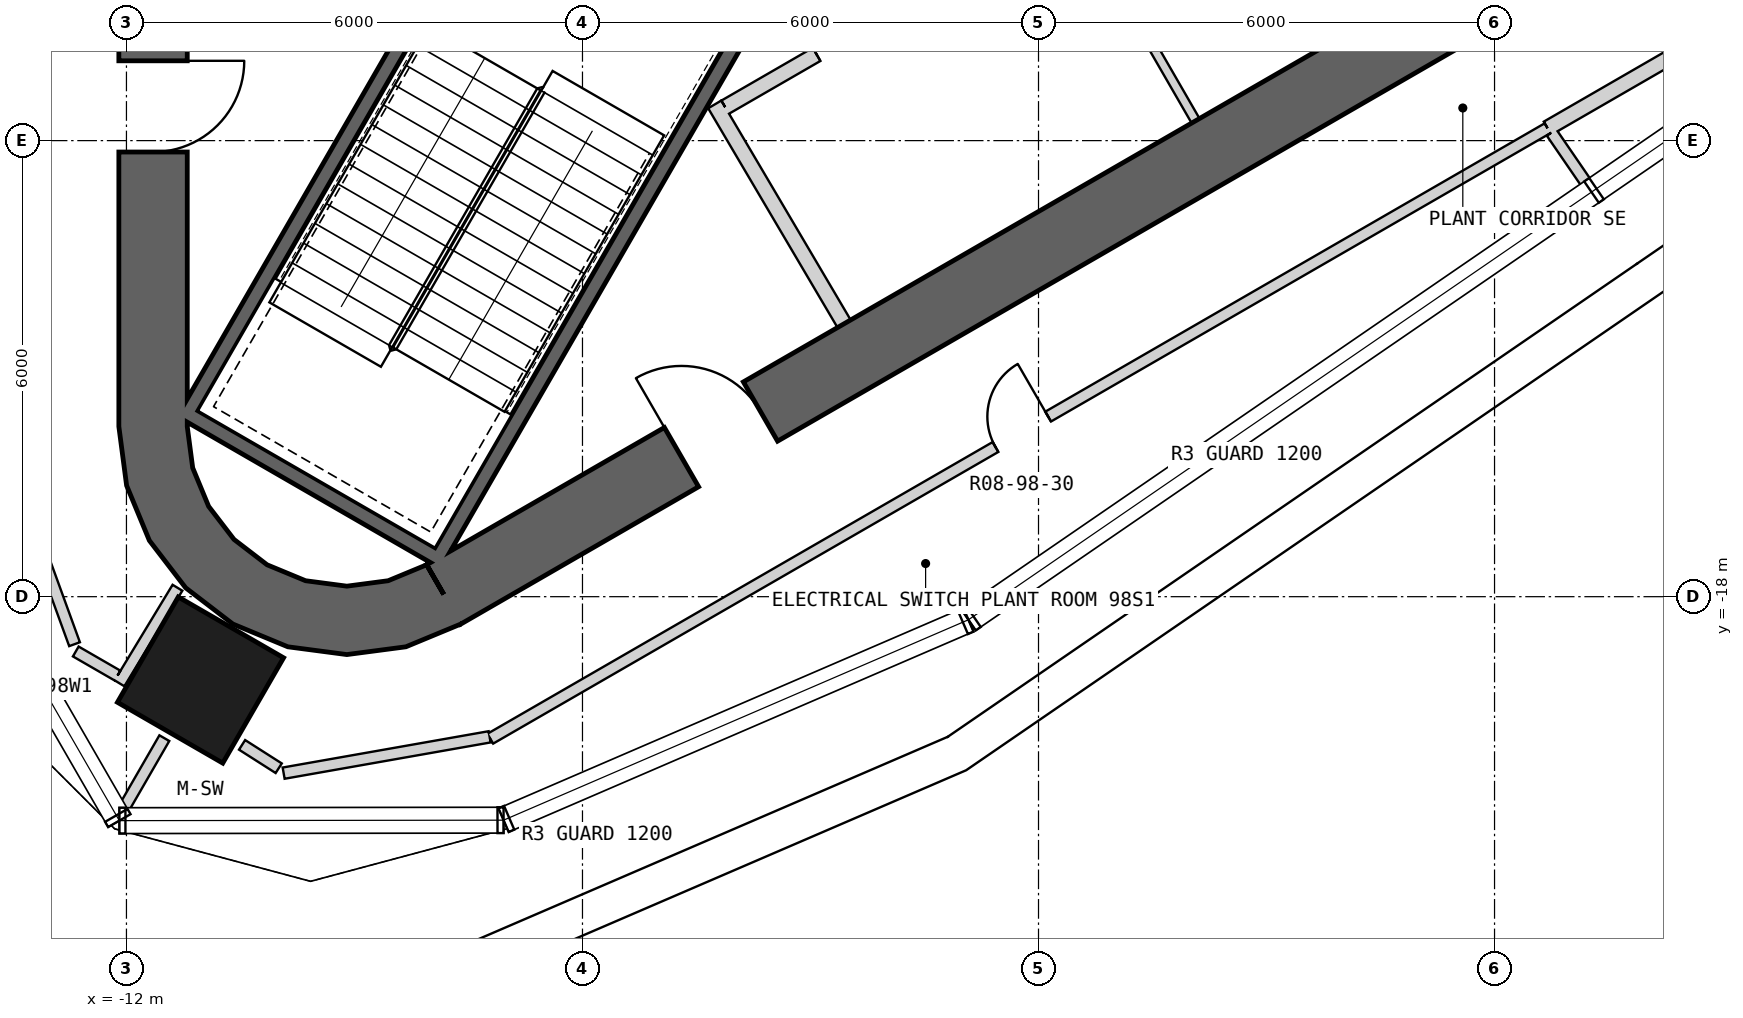
"""IFC4 building model, lengths in metres.
Left out: names, types, materials, properties, quantities, classifications, styles, units other than length and angle.
Written with IfcOpenShell. Run it as: python <this file> out.ifc"""

import sys

from ifc_helpers import new_model, si_unit, direction, frame, frame_2d, origin, origin_2d, place, context, subcontext, project, spatial, polyline, rectangle, outline, extrude, element, fill, save


model = new_model("IFC4")
c1 = context("Model", 3, precision=1e-05, world=origin(), true_north=direction((0.0, 1.0)))
c2 = subcontext(c1, "Body", "Model", "MODEL_VIEW")
j1 = project(units=[si_unit("LENGTHUNIT", "METRE"), si_unit("PLANEANGLEUNIT", "RADIAN")], contexts=[c1])
p1 = place(None, origin())
s1 = spatial("IfcSite", under=j1, at=p1, CompositionType="ELEMENT")
p2 = place(p1, origin())
s2 = spatial("IfcBuilding", under=s1, at=p2, CompositionType="ELEMENT")
p3 = place(p2, frame((0.0, 0.0, 435.3)))
s3 = spatial("IfcBuildingStorey", under=s2, at=p3, CompositionType="ELEMENT", Elevation=435.3)
p4 = place(p3, frame((-11.025, -19.097, 0.0), z_axis=(0.0, 0.0, 1.0), x_axis=(-0.5, -0.866025403784, 0.0)))
e1 = element("IfcColumn", 1, at=p4, inside=s3, PredefinedType="COLUMN", context=c2, shape_type="SweptSolid", body=[
    extrude(rectangle(XDim=1.6, YDim=1.6, at=origin_2d()), origin(), (0.0, 0.0, 1.0), 5.0),
])
p5 = place(p3, frame((-11.65, 15.762, 0.0), z_axis=(0.0, 0.0, 1.0), x_axis=(0.0, -1.0, 0.0)))
e2 = element("IfcWall", 2, at=p5, inside=s3, PredefinedType="SHEAR", context=c2, shape_type="SweptSolid", body=[
    extrude(rectangle(XDim=31.523, YDim=0.9, at=frame_2d((15.762, 0.0))), origin(), (0.0, 0.0, 1.0), 5.0),
])
p6 = place(p5, frame((3.612, 0.0, 0.0)))
e3 = element("IfcOpeningElement", 3, at=p6, cuts=e2, PredefinedType="OPENING", context=c2, shape_type="SweptSolid", body=[
    extrude(rectangle(XDim=1.2, YDim=2.4, at=frame_2d((0.6, 1.2))), frame((0.0, 0.46, 0.0), z_axis=(0.0, -1.0, 0.0), x_axis=(1.0, 0.0, 0.0)), (0.0, 0.0, 1.0), 0.92),
])
p7 = place(p5, frame((26.712, 0.0, 0.0)))
e4 = element("IfcOpeningElement", 4, at=p7, cuts=e2, PredefinedType="OPENING", context=c2, shape_type="SweptSolid", body=[
    extrude(rectangle(XDim=1.2, YDim=2.4, at=frame_2d((0.6, 1.2))), frame((0.0, 0.46, 0.0), z_axis=(0.0, -1.0, 0.0), x_axis=(1.0, 0.0, 0.0)), (0.0, 0.0, 1.0), 0.92),
])
p8 = place(p3, frame((-7.825, -17.97, 0.0), z_axis=(0.0, 0.0, 1.0), x_axis=(0.866028369851, 0.499994862586, 0.0)))
e5 = element("IfcWall", 5, at=p8, inside=s3, PredefinedType="SHEAR", context=c2, shape_type="SweptSolid", body=[
    extrude(rectangle(XDim=31.523, YDim=0.9, at=frame_2d((15.762, 0.0))), origin(), (0.0, 0.0, 1.0), 5.0),
])
p9 = place(p8, frame((17.862, 0.0, 0.0)))
e6 = element("IfcOpeningElement", 6, at=p9, cuts=e5, PredefinedType="OPENING", context=c2, shape_type="SweptSolid", body=[
    extrude(rectangle(XDim=1.2, YDim=2.4, at=frame_2d((0.6, 1.2))), frame((0.0, 0.46, 0.0), z_axis=(0.0, -1.0, 0.0), x_axis=(1.0, 0.0, 0.0)), (0.0, 0.0, 1.0), 0.92),
])
p10 = place(p8, frame((20.562, 0.0, 0.0)))
e7 = element("IfcOpeningElement", 7, at=p10, cuts=e5, PredefinedType="OPENING", context=c2, shape_type="SweptSolid", body=[
    extrude(rectangle(XDim=1.2, YDim=2.4, at=frame_2d((0.6, 1.2))), frame((0.0, 0.46, 0.0), z_axis=(0.0, -1.0, 0.0), x_axis=(1.0, 0.0, 0.0)), (0.0, 0.0, 1.0), 0.92),
])
p11 = place(p8, frame((26.712, 0.0, 0.0)))
e8 = element("IfcOpeningElement", 8, at=p11, cuts=e5, PredefinedType="OPENING", context=c2, shape_type="SweptSolid", body=[
    extrude(rectangle(XDim=1.2, YDim=2.4, at=frame_2d((0.6, 1.2))), frame((0.0, 0.46, 0.0), z_axis=(0.0, -1.0, 0.0), x_axis=(1.0, 0.0, 0.0)), (0.0, 0.0, 1.0), 0.92),
])
p12 = place(p8, frame((3.612, 0.0, 0.0)))
e9 = element("IfcOpeningElement", 9, at=p12, cuts=e5, PredefinedType="OPENING", context=c2, shape_type="SweptSolid", body=[
    extrude(rectangle(XDim=1.2, YDim=2.4, at=frame_2d((0.6, 1.2))), frame((0.0, 0.46, 0.0), z_axis=(0.0, -1.0, 0.0), x_axis=(1.0, 0.0, 0.0)), (0.0, 0.0, 1.0), 0.92),
])
p13 = place(p3, origin())
e10 = element("IfcWall", 10, at=p13, inside=s3, PredefinedType="SHEAR", context=c2, shape_type="SweptSolid", body=[
    extrude(outline(polyline([(-12.1, -15.762), (-11.998, -16.538), (-11.698, -17.262), (-11.221, -17.883), (-10.6, -18.36), (-9.876, -18.659), (-9.1, -18.762), (-8.323, -18.659), (-7.6, -18.36), (-8.05, -17.58), (-8.556, -17.79), (-9.1, -17.862), (-9.644, -17.79), (-10.15, -17.58), (-10.585, -17.247), (-10.919, -16.812), (-11.128, -16.305), (-11.2, -15.762), (-12.1, -15.762)])), origin(), (0.0, 0.0, 1.0), 5.0),
])
p14 = place(p3, frame((-3.905, -10.563, -0.25), z_axis=(0.0, 0.0, 1.0), x_axis=(-0.500012932018, -0.866017937352, 0.0)))
e11 = element("IfcWall", 11, at=p14, inside=s3, PredefinedType="SHEAR", context=c2, shape_type="SweptSolid", body=[
    extrude(rectangle(XDim=8.1, YDim=0.2, at=frame_2d((4.05, 0.0))), origin(), (0.0, 0.0, 1.0), 5.0),
])
p15 = place(p3, frame((-11.282, -15.541, -0.25), z_axis=(0.0, 0.0, 1.0), x_axis=(0.866000483506, -0.500043160704, 0.0)))
e12 = element("IfcWall", 12, at=p15, inside=s3, PredefinedType="SHEAR", context=c2, shape_type="SweptSolid", body=[
    extrude(rectangle(XDim=3.8, YDim=0.2, at=frame_2d((1.9, 0.0))), origin(), (0.0, 0.0, 1.0), 5.0),
])
p16 = place(p3, frame((-7.196, -8.663, -0.25), z_axis=(0.0, 0.0, 1.0), x_axis=(-0.499997992926, -0.866026562566, 0.0)))
e13 = element("IfcWall", 13, at=p16, inside=s3, PredefinedType="SHEAR", context=c2, shape_type="SweptSolid", body=[
    extrude(rectangle(XDim=7.9, YDim=0.2, at=frame_2d((3.95, 0.0))), origin(), (0.0, 0.0, 1.0), 5.0),
])
p17 = place(p3, frame((2.067, -11.74, 0.0), z_axis=(0.0, 0.0, 1.0), x_axis=(-0.499984717929, 0.866034226713, 0.0)))
e14 = element("IfcWall", 14, at=p17, inside=s3, PredefinedType="PARTITIONING", context=c2, shape_type="SweptSolid", body=[
    extrude(rectangle(XDim=3.25, YDim=0.12, at=frame_2d((1.625, 0.0))), origin(), (0.0, 0.0, 1.0), 4.75),
])
p18 = place(p3, frame((-4.26, -11.524, 0.0), z_axis=(0.0, 0.0, 1.0), x_axis=(0.507997497166, -0.861358544901, 0.0)))
e15 = element("IfcWall", 15, at=p18, inside=s3, PredefinedType="PARTITIONING", context=c2, shape_type="SweptSolid", body=[
    extrude(rectangle(XDim=3.35, YDim=0.2, at=frame_2d((1.675, 0.0))), origin(), (0.0, 0.0, 1.0), 4.75),
])
p19 = place(p3, frame((-1.024, -9.771, 0.0), z_axis=(0.0, 0.0, 1.0), x_axis=(-0.866029903013, -0.499992207027, 0.0)))
e16 = element("IfcWall", 16, at=p19, inside=s3, PredefinedType="PARTITIONING", context=c2, shape_type="SweptSolid", body=[
    extrude(rectangle(XDim=3.578, YDim=0.2, at=frame_2d((1.789, 0.0))), origin(), (0.0, 0.0, 1.0), 4.75),
])
p20 = place(p19, frame((1.389, 0.0, 0.0)))
e17 = element("IfcOpeningElement", 17, at=p20, cuts=e16, PredefinedType="OPENING", context=c2, shape_type="SweptSolid", body=[
    extrude(rectangle(XDim=0.8, YDim=2.1, at=frame_2d((0.4, 1.05))), frame((0.0, 0.11, 0.0), z_axis=(0.0, -1.0, 0.0), x_axis=(1.0, 0.0, 0.0)), (0.0, 0.0, 1.0), 0.22),
])
p21 = place(p3, frame((-12.091, -19.14, 0.0), z_axis=(0.0, 0.0, 1.0), x_axis=(0.518518801369, 0.855066227041, 0.0)))
e18 = element("IfcWall", 18, at=p21, inside=s3, PredefinedType="PLUMBINGWALL", context=c2, shape_type="SweptSolid", body=[
    extrude(rectangle(XDim=1.47, YDim=0.15, at=frame_2d((0.735, 0.0))), origin(), (0.0, 0.0, 1.0), 4.75),
])
p22 = place(p3, frame((-12.667, -18.721, 0.0), z_axis=(0.0, 0.0, 1.0), x_axis=(0.866031754707, -0.499988999718, 0.0)))
e19 = element("IfcWall", 19, at=p22, inside=s3, PredefinedType="PLUMBINGWALL", context=c2, shape_type="SweptSolid", body=[
    extrude(rectangle(XDim=0.634, YDim=0.15, at=frame_2d((0.317, 0.0))), origin(), (0.0, 0.0, 1.0), 4.75),
])
p23 = place(p3, frame((-13.626, -16.035, 0.0), z_axis=(0.0, 0.0, 1.0), x_axis=(0.342070181816, -0.939674406756, 0.0)))
e20 = element("IfcWall", 20, at=p23, inside=s3, PredefinedType="PLUMBINGWALL", context=c2, shape_type="SweptSolid", body=[
    extrude(rectangle(XDim=2.756, YDim=0.15, at=frame_2d((1.378, 0.0))), origin(), (0.0, 0.0, 1.0), 4.75),
])
p24 = place(p3, frame((-11.501, -19.861, 0.0), z_axis=(0.0, 0.0, 1.0), x_axis=(-0.500107244371, -0.865963477364, 0.0)))
e21 = element("IfcWall", 21, at=p24, inside=s3, PredefinedType="PLUMBINGWALL", context=c2, shape_type="SweptSolid", body=[
    extrude(rectangle(XDim=1.098, YDim=0.15, at=frame_2d((0.549, 0.0))), origin(), (0.0, 0.0, 1.0), 3.93),
])
p25 = place(p3, frame((-7.213, -19.868, 0.0), z_axis=(0.0, 0.0, 1.0), x_axis=(0.866026120779, 0.499998758127, 0.0)))
e22 = element("IfcWall", 22, at=p25, inside=s3, PredefinedType="PLUMBINGWALL", context=c2, shape_type="SweptSolid", body=[
    extrude(rectangle(XDim=16.062, YDim=0.15, at=frame_2d((8.031, 0.0))), origin(), (0.0, 0.0, 1.0), 4.75),
])
p26 = place(p25, frame((7.675, 0.0, 0.0)))
e23 = element("IfcOpeningElement", 23, at=p26, cuts=e22, PredefinedType="OPENING", context=c2, shape_type="SweptSolid", body=[
    extrude(rectangle(XDim=0.8, YDim=2.1, at=frame_2d((0.4, 1.05))), frame((0.0, 0.085, 0.0), z_axis=(0.0, -1.0, 0.0), x_axis=(1.0, 0.0, 0.0)), (0.0, 0.0, 1.0), 0.17),
])
p27 = place(p3, frame((-9.932, -20.322, 0.0), z_axis=(0.0, 0.0, 1.0), x_axis=(0.984813908974, 0.173613261856, 0.0)))
e24 = element("IfcWall", 24, at=p27, inside=s3, PredefinedType="PLUMBINGWALL", context=c2, shape_type="SweptSolid", body=[
    extrude(rectangle(XDim=2.752, YDim=0.15, at=frame_2d((1.376, 0.0))), origin(), (0.0, 0.0, 1.0), 4.75),
])
p28 = place(p3, frame((-10.479, -19.95, 0.0), z_axis=(0.0, 0.0, 1.0), x_axis=(0.843309487859, -0.537428234917, 0.0)))
e25 = element("IfcWall", 25, at=p28, inside=s3, PredefinedType="PLUMBINGWALL", context=c2, shape_type="SweptSolid", body=[
    extrude(rectangle(XDim=0.572, YDim=0.15, at=frame_2d((0.286, 0.0))), origin(), (0.0, 0.0, 1.0), 4.75),
])
p29 = place(p3, frame((6.698, -11.837, 0.0), z_axis=(0.0, 0.0, 1.0), x_axis=(0.866022444471, 0.500005125646, 0.0)))
e26 = element("IfcWall", 26, at=p29, inside=s3, PredefinedType="PARTITIONING", context=c2, shape_type="SweptSolid", body=[
    extrude(rectangle(XDim=16.124, YDim=0.2, at=frame_2d((8.062, 0.0))), origin(), (0.0, 0.0, 1.0), 4.75),
])
p30 = place(p29, frame((2.044, 0.0, 0.0)))
e27 = element("IfcOpeningElement", 27, at=p30, cuts=e26, PredefinedType="OPENING", context=c2, shape_type="SweptSolid", body=[
    extrude(rectangle(XDim=1.0, YDim=2.1, at=frame_2d((0.5, 1.05))), frame((0.0, 0.11, 0.0), z_axis=(0.0, -1.0, 0.0), x_axis=(1.0, 0.0, 0.0)), (0.0, 0.0, 1.0), 0.22),
])
p31 = place(p3, frame((7.213, -12.568, 0.0), z_axis=(0.0, 0.0, 1.0), x_axis=(-0.565933909506, 0.824450611056, 0.0)))
e28 = element("IfcWall", 28, at=p31, inside=s3, PredefinedType="PLUMBINGWALL", context=c2, shape_type="SweptSolid", body=[
    extrude(rectangle(XDim=0.819, YDim=0.15, at=frame_2d((0.409, 0.0))), origin(), (0.0, 0.0, 1.0), 4.75),
])
p32 = place(p20, origin())
e29 = element("IfcDoor", 29, at=p32, inside=s3, OperationType="SINGLE_SWING_LEFT", PredefinedType="USERDEFINED", context=c2, shape_type="SweptSolid", body=[
    extrude(rectangle(XDim=0.8, YDim=2.1, at=frame_2d((0.4, 1.05))), frame((0.0, 0.025, 0.0), z_axis=(0.0, -1.0, 0.0), x_axis=(1.0, 0.0, 0.0)), (0.0, 0.0, 1.0), 0.05),
])
fill(e17, e29)
p33 = place(p26, origin())
e30 = element("IfcDoor", 30, at=p33, inside=s3, OperationType="SINGLE_SWING_RIGHT", PredefinedType="USERDEFINED", context=c2, shape_type="SweptSolid", body=[
    extrude(rectangle(XDim=0.8, YDim=2.1, at=frame_2d((0.4, 1.05))), frame((0.0, 0.025, 0.0), z_axis=(0.0, -1.0, 0.0), x_axis=(1.0, 0.0, 0.0)), (0.0, 0.0, 1.0), 0.05),
])
fill(e23, e30)
p34 = place(p7, origin())
e31 = element("IfcDoor", 31, at=p34, inside=s3, OperationType="SINGLE_SWING_LEFT", PredefinedType="USERDEFINED", context=c2, shape_type="SweptSolid", body=[
    extrude(rectangle(XDim=1.2, YDim=2.4, at=frame_2d((0.6, 1.2))), frame((0.0, 0.025, 0.0), z_axis=(0.0, -1.0, 0.0), x_axis=(1.0, 0.0, 0.0)), (0.0, 0.0, 1.0), 0.05),
])
fill(e4, e31)
p35 = place(p12, origin())
e32 = element("IfcDoor", 32, at=p35, inside=s3, OperationType="SINGLE_SWING_LEFT", PredefinedType="USERDEFINED", context=c2, shape_type="SweptSolid", body=[
    extrude(rectangle(XDim=1.2, YDim=2.4, at=frame_2d((0.6, 1.2))), frame((0.0, 0.025, 0.0), z_axis=(0.0, -1.0, 0.0), x_axis=(1.0, 0.0, 0.0)), (0.0, 0.0, 1.0), 0.05),
])
fill(e9, e32)
save(model, sys.argv[1])
